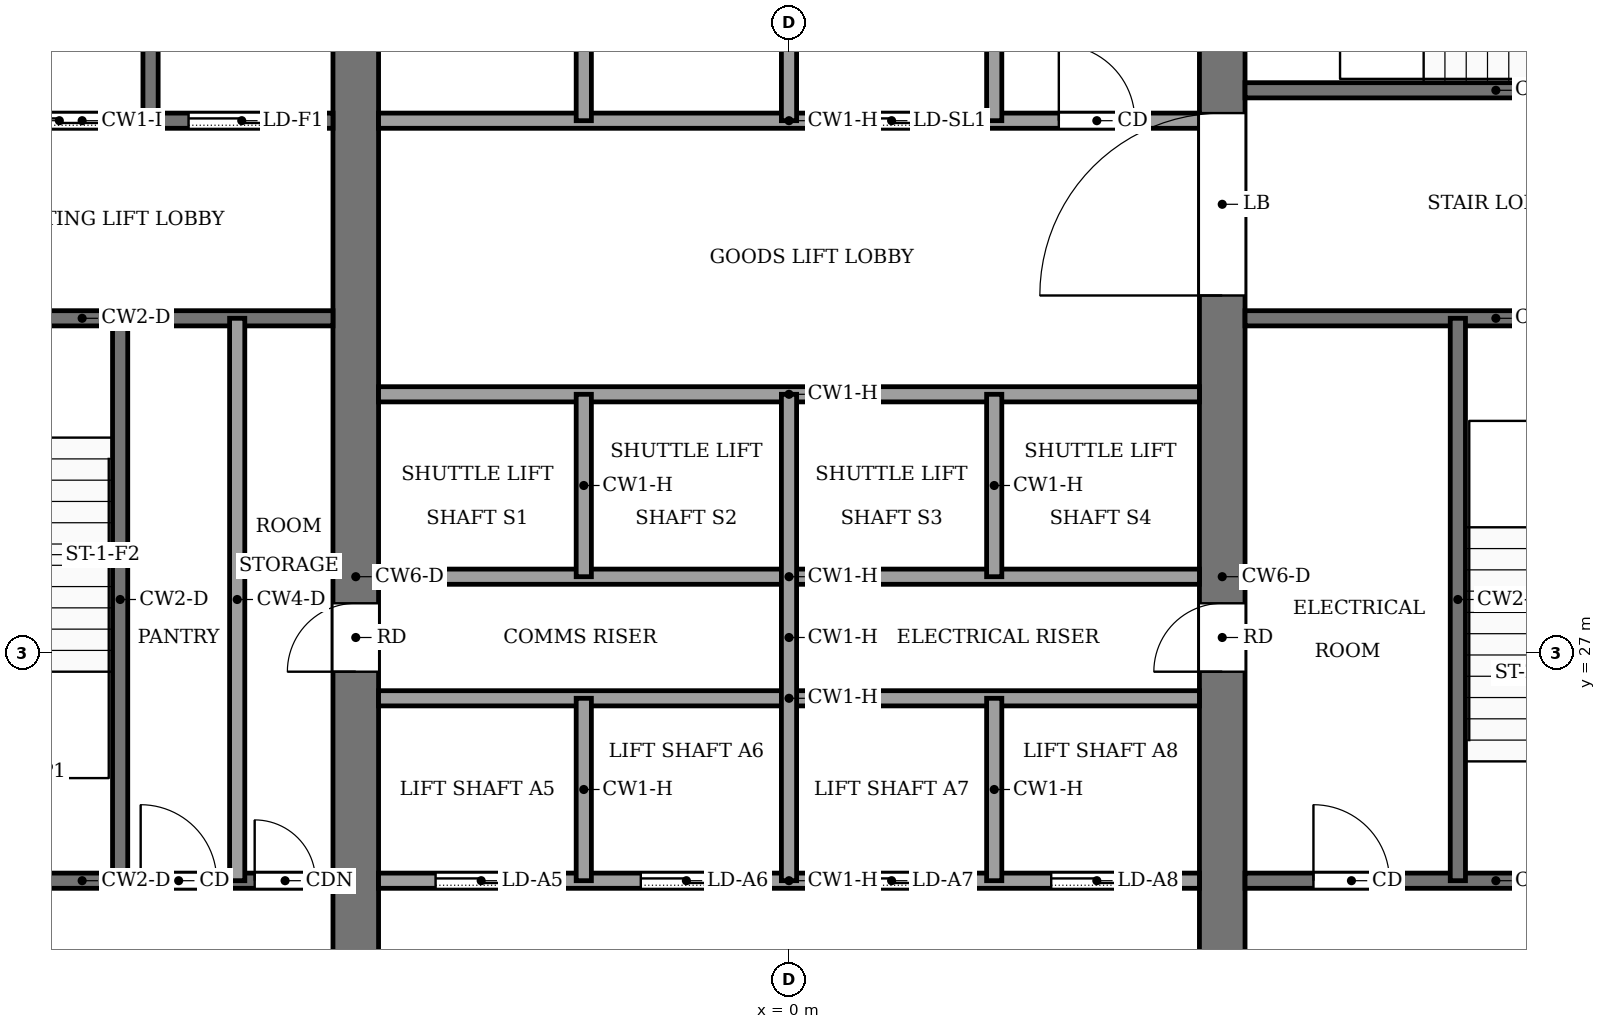
"""IFC4 building model, lengths in metres.
Left out: names, types, materials, properties, quantities, classifications, styles, units other than length and angle.
Written with IfcOpenShell. Run it as: python <this file> out.ifc"""

import sys

from ifc_helpers import new_model, si_unit, direction, frame, frame_2d, origin, place, context, subcontext, project, spatial, rectangle, extrude, element, fill, save


model = new_model("IFC4")
c1 = context("Model", 3, precision=1e-05, world=origin(), true_north=direction((0.0, 1.0)))
c2 = subcontext(c1, "Body", "Model", "MODEL_VIEW")
j1 = project(units=[si_unit("LENGTHUNIT", "METRE"), si_unit("PLANEANGLEUNIT", "RADIAN")], contexts=[c1])
p1 = place(None, origin())
s1 = spatial("IfcSite", under=j1, at=p1, CompositionType="ELEMENT")
p2 = place(p1, origin())
s2 = spatial("IfcBuilding", under=s1, at=p2, CompositionType="ELEMENT")
p3 = place(p2, frame((0.0, 0.0, 110.0)))
s3 = spatial("IfcBuildingStorey", under=s2, at=p3, CompositionType="ELEMENT", Elevation=110.0)
p4 = place(p3, frame((-5.7, 18.4, -0.13), z_axis=(0.0, 0.0, 1.0), x_axis=(0.0, 1.0, 0.0)))
e1 = element("IfcWall", 1, at=p4, inside=s3, PredefinedType="SHEAR", context=c2, shape_type="SweptSolid", body=[
    extrude(rectangle(XDim=19.2, YDim=0.6, at=frame_2d((9.6, 0.0))), origin(), (0.0, 0.0, 1.0), 3.88),
])
p5 = place(p4, frame((8.35, 0.0, 0.13)))
e2 = element("IfcOpeningElement", 2, at=p5, cuts=e1, PredefinedType="OPENING", context=c2, shape_type="SweptSolid", body=[
    extrude(rectangle(XDim=0.9, YDim=2.1, at=frame_2d((0.45, 1.05))), frame((0.0, 0.31, 0.0), z_axis=(0.0, -1.0, 0.0), x_axis=(1.0, 0.0, 0.0)), (0.0, 0.0, 1.0), 0.62),
])
p6 = place(p3, frame((5.7, 18.4, -0.13), z_axis=(0.0, 0.0, 1.0), x_axis=(0.0, 1.0, 0.0)))
e3 = element("IfcWall", 3, at=p6, inside=s3, PredefinedType="SHEAR", context=c2, shape_type="SweptSolid", body=[
    extrude(rectangle(XDim=19.2, YDim=0.6, at=frame_2d((9.6, 0.0))), origin(), (0.0, 0.0, 1.0), 3.88),
])
p7 = place(p6, frame((8.35, 0.0, 0.13)))
e4 = element("IfcOpeningElement", 4, at=p7, cuts=e3, PredefinedType="OPENING", context=c2, shape_type="SweptSolid", body=[
    extrude(rectangle(XDim=0.9, YDim=2.1, at=frame_2d((0.45, 1.05))), frame((0.0, 0.31, 0.0), z_axis=(0.0, -1.0, 0.0), x_axis=(1.0, 0.0, 0.0)), (0.0, 0.0, 1.0), 0.62),
])
p8 = place(p6, frame((13.3, 0.0, 0.13)))
e5 = element("IfcOpeningElement", 5, at=p8, cuts=e3, PredefinedType="OPENING", context=c2, shape_type="SweptSolid", body=[
    extrude(rectangle(XDim=2.4, YDim=2.4, at=frame_2d((1.2, 1.2))), frame((0.0, 0.31, 0.0), z_axis=(0.0, -1.0, 0.0), x_axis=(1.0, 0.0, 0.0)), (0.0, 0.0, 1.0), 0.62),
])
p9 = place(p3, frame((-12.6, 24.0, 0.0), z_axis=(0.0, 0.0, 1.0), x_axis=(1.0, 0.0, 0.0)))
e6 = element("IfcWall", 6, at=p9, inside=s3, PredefinedType="PARTITIONING", context=c2, shape_type="SweptSolid", body=[
    extrude(rectangle(XDim=6.6, YDim=0.2, at=frame_2d((3.3, 0.0))), origin(), (0.0, 0.0, 1.0), 3.75),
])
p10 = place(p9, frame((4.07, 0.0, 0.0)))
e7 = element("IfcOpeningElement", 7, at=p10, cuts=e6, PredefinedType="OPENING", context=c2, shape_type="SweptSolid", body=[
    extrude(rectangle(XDim=1.0, YDim=2.1, at=frame_2d((0.5, 1.05))), frame((0.0, 0.11, 0.0), z_axis=(0.0, -1.0, 0.0), x_axis=(1.0, 0.0, 0.0)), (0.0, 0.0, 1.0), 0.22),
])
p11 = place(p9, frame((5.57, 0.0, 0.0)))
e8 = element("IfcOpeningElement", 8, at=p11, cuts=e6, PredefinedType="OPENING", context=c2, shape_type="SweptSolid", body=[
    extrude(rectangle(XDim=0.8, YDim=2.1, at=frame_2d((0.4, 1.05))), frame((0.0, 0.11, 0.0), z_axis=(0.0, -1.0, 0.0), x_axis=(1.0, 0.0, 0.0)), (0.0, 0.0, 1.0), 0.22),
])
p12 = place(p3, frame((-5.4, 24.0, 0.0), z_axis=(0.0, 0.0, 1.0), x_axis=(1.0, 0.0, 0.0)))
e9 = element("IfcWall", 9, at=p12, inside=s3, PredefinedType="PARTITIONING", context=c2, shape_type="SweptSolid", body=[
    extrude(rectangle(XDim=10.8, YDim=0.2, at=frame_2d((5.4, 0.0))), origin(), (0.0, 0.0, 1.0), 3.75),
])
p13 = place(p12, frame((0.75, 0.0, 0.0)))
e10 = element("IfcOpeningElement", 10, at=p13, cuts=e9, PredefinedType="OPENING", context=c2, shape_type="SweptSolid", body=[
    extrude(rectangle(XDim=1.2, YDim=2.2, at=frame_2d((0.6, 1.1))), frame((0.0, 0.11, 0.0), z_axis=(0.0, -1.0, 0.0), x_axis=(1.0, 0.0, 0.0)), (0.0, 0.0, 1.0), 0.22),
])
p14 = place(p12, frame((3.45, 0.0, 0.0)))
e11 = element("IfcOpeningElement", 11, at=p14, cuts=e9, PredefinedType="OPENING", context=c2, shape_type="SweptSolid", body=[
    extrude(rectangle(XDim=1.2, YDim=2.2, at=frame_2d((0.6, 1.1))), frame((0.0, 0.11, 0.0), z_axis=(0.0, -1.0, 0.0), x_axis=(1.0, 0.0, 0.0)), (0.0, 0.0, 1.0), 0.22),
])
p15 = place(p12, frame((6.15, 0.0, 0.0)))
e12 = element("IfcOpeningElement", 12, at=p15, cuts=e9, PredefinedType="OPENING", context=c2, shape_type="SweptSolid", body=[
    extrude(rectangle(XDim=1.2, YDim=2.2, at=frame_2d((0.6, 1.1))), frame((0.0, 0.11, 0.0), z_axis=(0.0, -1.0, 0.0), x_axis=(1.0, 0.0, 0.0)), (0.0, 0.0, 1.0), 0.22),
])
p16 = place(p12, frame((8.85, 0.0, 0.0)))
e13 = element("IfcOpeningElement", 13, at=p16, cuts=e9, PredefinedType="OPENING", context=c2, shape_type="SweptSolid", body=[
    extrude(rectangle(XDim=1.2, YDim=2.2, at=frame_2d((0.6, 1.1))), frame((0.0, 0.11, 0.0), z_axis=(0.0, -1.0, 0.0), x_axis=(1.0, 0.0, 0.0)), (0.0, 0.0, 1.0), 0.22),
])
p17 = place(p3, frame((6.0, 24.0, 0.0), z_axis=(0.0, 0.0, 1.0), x_axis=(1.0, 0.0, 0.0)))
e14 = element("IfcWall", 14, at=p17, inside=s3, PredefinedType="PARTITIONING", context=c2, shape_type="SweptSolid", body=[
    extrude(rectangle(XDim=6.6, YDim=0.2, at=frame_2d((3.3, 0.0))), origin(), (0.0, 0.0, 1.0), 3.75),
])
p18 = place(p17, frame((0.9, 0.0, 0.0)))
e15 = element("IfcOpeningElement", 15, at=p18, cuts=e14, PredefinedType="OPENING", context=c2, shape_type="SweptSolid", body=[
    extrude(rectangle(XDim=1.0, YDim=2.1, at=frame_2d((0.5, 1.05))), frame((0.0, 0.11, 0.0), z_axis=(0.0, -1.0, 0.0), x_axis=(1.0, 0.0, 0.0)), (0.0, 0.0, 1.0), 0.22),
])
p19 = place(p17, frame((4.4, 0.0, 0.0)))
e16 = element("IfcOpeningElement", 16, at=p19, cuts=e14, PredefinedType="OPENING", context=c2, shape_type="SweptSolid", body=[
    extrude(rectangle(XDim=1.2, YDim=2.2, at=frame_2d((0.6, 1.1))), frame((0.0, 0.11, 0.0), z_axis=(0.0, -1.0, 0.0), x_axis=(1.0, 0.0, 0.0)), (0.0, 0.0, 1.0), 0.22),
])
for number, where, z_axis, x_axis in (
    (17, (-5.4, 26.4, 0.0), (0.0, 0.0, 1.0), (1.0, 0.0, 0.0)),
    (18, (-5.4, 28.0, 0.0), (0.0, 0.0, 1.0), (1.0, 0.0, 0.0)),
    (19, (-5.4, 30.4, 0.0), (0.0, 0.0, 1.0), (1.0, 0.0, 0.0)),
):
    element("IfcWall", number, at=place(p3, frame(where, z_axis=z_axis, x_axis=x_axis)), inside=s3, PredefinedType="PARTITIONING", context=c2, shape_type="SweptSolid", body=[
        extrude(rectangle(XDim=10.8, YDim=0.2, at=frame_2d((5.4, 0.0))), origin(), (0.0, 0.0, 1.0), 3.75),
    ])
p20 = place(p3, frame((-12.6, 31.4, 0.0), z_axis=(0.0, 0.0, 1.0), x_axis=(1.0, 0.0, 0.0)))
e20 = element("IfcWall", 20, at=p20, inside=s3, PredefinedType="PARTITIONING", context=c2, shape_type="SweptSolid", body=[
    extrude(rectangle(XDim=6.6, YDim=0.2, at=frame_2d((3.3, 0.0))), origin(), (0.0, 0.0, 1.0), 3.75),
])
p21 = place(p20, frame((1.0, 0.0, 0.0)))
e21 = element("IfcOpeningElement", 21, at=p21, cuts=e20, PredefinedType="OPENING", context=c2, shape_type="SweptSolid", body=[
    extrude(rectangle(XDim=1.2, YDim=2.2, at=frame_2d((0.6, 1.1))), frame((0.0, 0.11, 0.0), z_axis=(0.0, -1.0, 0.0), x_axis=(1.0, 0.0, 0.0)), (0.0, 0.0, 1.0), 0.22),
])
p22 = place(p3, frame((6.0, 31.4, 0.0), z_axis=(0.0, 0.0, 1.0), x_axis=(1.0, 0.0, 0.0)))
e22 = element("IfcWall", 22, at=p22, inside=s3, PredefinedType="PARTITIONING", context=c2, shape_type="SweptSolid", body=[
    extrude(rectangle(XDim=6.6, YDim=0.2, at=frame_2d((3.3, 0.0))), origin(), (0.0, 0.0, 1.0), 3.75),
])
p23 = place(p3, frame((-12.6, 34.0, 0.0), z_axis=(0.0, 0.0, 1.0), x_axis=(1.0, 0.0, 0.0)))
e23 = element("IfcWall", 23, at=p23, inside=s3, PredefinedType="PARTITIONING", context=c2, shape_type="SweptSolid", body=[
    extrude(rectangle(XDim=6.6, YDim=0.2, at=frame_2d((3.3, 0.0))), origin(), (0.0, 0.0, 1.0), 3.75),
])
p24 = place(p23, frame((4.7, 0.0, 0.0)))
e24 = element("IfcOpeningElement", 24, at=p24, cuts=e23, PredefinedType="OPENING", context=c2, shape_type="SweptSolid", body=[
    extrude(rectangle(XDim=1.4, YDim=2.2, at=frame_2d((0.7, 1.1))), frame((0.0, 0.11, 0.0), z_axis=(0.0, -1.0, 0.0), x_axis=(1.0, 0.0, 0.0)), (0.0, 0.0, 1.0), 0.22),
])
p25 = place(p23, frame((2.3, 0.0, 0.0)))
e25 = element("IfcOpeningElement", 25, at=p25, cuts=e23, PredefinedType="OPENING", context=c2, shape_type="SweptSolid", body=[
    extrude(rectangle(XDim=1.4, YDim=2.2, at=frame_2d((0.7, 1.1))), frame((0.0, 0.11, 0.0), z_axis=(0.0, -1.0, 0.0), x_axis=(1.0, 0.0, 0.0)), (0.0, 0.0, 1.0), 0.22),
])
p26 = place(p23, frame((0.45, 0.0, 0.0)))
e26 = element("IfcOpeningElement", 26, at=p26, cuts=e23, PredefinedType="OPENING", context=c2, shape_type="SweptSolid", body=[
    extrude(rectangle(XDim=0.9, YDim=2.1, at=frame_2d((0.45, 1.05))), frame((0.0, 0.11, 0.0), z_axis=(0.0, -1.0, 0.0), x_axis=(1.0, 0.0, 0.0)), (0.0, 0.0, 1.0), 0.22),
])
p27 = place(p3, frame((-5.4, 34.0, 0.0), z_axis=(0.0, 0.0, 1.0), x_axis=(1.0, 0.0, 0.0)))
e27 = element("IfcWall", 27, at=p27, inside=s3, PredefinedType="PARTITIONING", context=c2, shape_type="SweptSolid", body=[
    extrude(rectangle(XDim=10.8, YDim=0.2, at=frame_2d((5.4, 0.0))), origin(), (0.0, 0.0, 1.0), 3.75),
])
p28 = place(p27, frame((6.15, 0.0, 0.0)))
e28 = element("IfcOpeningElement", 28, at=p28, cuts=e27, PredefinedType="OPENING", context=c2, shape_type="SweptSolid", body=[
    extrude(rectangle(XDim=1.2, YDim=2.2, at=frame_2d((0.6, 1.1))), frame((0.0, 0.11, 0.0), z_axis=(0.0, -1.0, 0.0), x_axis=(1.0, 0.0, 0.0)), (0.0, 0.0, 1.0), 0.22),
])
p29 = place(p27, frame((8.95, 0.0, 0.0)))
e29 = element("IfcOpeningElement", 29, at=p29, cuts=e27, PredefinedType="OPENING", context=c2, shape_type="SweptSolid", body=[
    extrude(rectangle(XDim=1.0, YDim=2.1, at=frame_2d((0.5, 1.05))), frame((0.0, 0.11, 0.0), z_axis=(0.0, -1.0, 0.0), x_axis=(1.0, 0.0, 0.0)), (0.0, 0.0, 1.0), 0.22),
])
p30 = place(p3, frame((6.0, 34.4, 0.0), z_axis=(0.0, 0.0, 1.0), x_axis=(1.0, 0.0, 0.0)))
e30 = element("IfcWall", 30, at=p30, inside=s3, PredefinedType="PARTITIONING", context=c2, shape_type="SweptSolid", body=[
    extrude(rectangle(XDim=6.6, YDim=0.2, at=frame_2d((3.3, 0.0))), origin(), (0.0, 0.0, 1.0), 3.75),
])
p31 = place(p30, frame((4.8, 0.0, 0.0)))
e31 = element("IfcOpeningElement", 31, at=p31, cuts=e30, PredefinedType="OPENING", context=c2, shape_type="SweptSolid", body=[
    extrude(rectangle(XDim=1.2, YDim=2.2, at=frame_2d((0.6, 1.1))), frame((0.0, 0.11, 0.0), z_axis=(0.0, -1.0, 0.0), x_axis=(1.0, 0.0, 0.0)), (0.0, 0.0, 1.0), 0.22),
])
p32 = place(p3, frame((-8.8, 24.0, 0.0), z_axis=(0.0, 0.0, 1.0), x_axis=(0.0, 1.0, 0.0)))
e32 = element("IfcWall", 32, at=p32, inside=s3, PredefinedType="PARTITIONING", context=c2, shape_type="SweptSolid", body=[
    extrude(rectangle(XDim=7.4, YDim=0.2, at=frame_2d((3.7, 0.0))), origin(), (0.0, 0.0, 1.0), 3.75),
])
p33 = place(p3, frame((-8.4, 34.0, 0.0), z_axis=(0.0, 0.0, 1.0), x_axis=(0.0, 1.0, 0.0)))
e33 = element("IfcWall", 33, at=p33, inside=s3, PredefinedType="PARTITIONING", context=c2, shape_type="SweptSolid", body=[
    extrude(rectangle(XDim=3.6, YDim=0.2, at=frame_2d((1.8, 0.0))), origin(), (0.0, 0.0, 1.0), 3.75),
])
p34 = place(p3, frame((-7.26, 24.0, 0.0), z_axis=(0.0, 0.0, 1.0), x_axis=(0.0, 1.0, 0.0)))
e34 = element("IfcWall", 34, at=p34, inside=s3, PredefinedType="PARTITIONING", context=c2, shape_type="SweptSolid", body=[
    extrude(rectangle(XDim=7.4, YDim=0.2, at=frame_2d((3.7, 0.0))), origin(), (0.0, 0.0, 1.0), 3.75),
])
for number, where, z_axis, x_axis in (
    (35, (-2.7, 24.0, 0.0), (0.0, 0.0, 1.0), (0.0, 1.0, 0.0)),
    (36, (-2.7, 28.0, 0.0), (0.0, 0.0, 1.0), (0.0, 1.0, 0.0)),
):
    element("IfcWall", number, at=place(p3, frame(where, z_axis=z_axis, x_axis=x_axis)), inside=s3, PredefinedType="PARTITIONING", context=c2, shape_type="SweptSolid", body=[
        extrude(rectangle(XDim=2.4, YDim=0.2, at=frame_2d((1.2, 0.0))), origin(), (0.0, 0.0, 1.0), 3.75),
    ])
p35 = place(p3, frame((-2.7, 34.0, 0.0), z_axis=(0.0, 0.0, 1.0), x_axis=(0.0, 1.0, 0.0)))
e37 = element("IfcWall", 37, at=p35, inside=s3, PredefinedType="PARTITIONING", context=c2, shape_type="SweptSolid", body=[
    extrude(rectangle(XDim=3.6, YDim=0.2, at=frame_2d((1.8, 0.0))), origin(), (0.0, 0.0, 1.0), 3.75),
])
p36 = place(p3, frame((0.0, 24.0, 0.0), z_axis=(0.0, 0.0, 1.0), x_axis=(0.0, 1.0, 0.0)))
e38 = element("IfcWall", 38, at=p36, inside=s3, PredefinedType="PARTITIONING", context=c2, shape_type="SweptSolid", body=[
    extrude(rectangle(XDim=6.4, YDim=0.2, at=frame_2d((3.2, 0.0))), origin(), (0.0, 0.0, 1.0), 3.75),
])
p37 = place(p3, frame((0.0, 34.0, 0.0), z_axis=(0.0, 0.0, 1.0), x_axis=(0.0, 1.0, 0.0)))
e39 = element("IfcWall", 39, at=p37, inside=s3, PredefinedType="PARTITIONING", context=c2, shape_type="SweptSolid", body=[
    extrude(rectangle(XDim=3.6, YDim=0.2, at=frame_2d((1.8, 0.0))), origin(), (0.0, 0.0, 1.0), 3.75),
])
for number, where, z_axis, x_axis in (
    (40, (2.7, 24.0, 0.0), (0.0, 0.0, 1.0), (0.0, 1.0, 0.0)),
    (41, (2.7, 28.0, 0.0), (0.0, 0.0, 1.0), (0.0, 1.0, 0.0)),
):
    element("IfcWall", number, at=place(p3, frame(where, z_axis=z_axis, x_axis=x_axis)), inside=s3, PredefinedType="PARTITIONING", context=c2, shape_type="SweptSolid", body=[
        extrude(rectangle(XDim=2.4, YDim=0.2, at=frame_2d((1.2, 0.0))), origin(), (0.0, 0.0, 1.0), 3.75),
    ])
p38 = place(p3, frame((2.7, 34.0, 0.0), z_axis=(0.0, 0.0, 1.0), x_axis=(0.0, 1.0, 0.0)))
e42 = element("IfcWall", 42, at=p38, inside=s3, PredefinedType="PARTITIONING", context=c2, shape_type="SweptSolid", body=[
    extrude(rectangle(XDim=3.6, YDim=0.2, at=frame_2d((1.8, 0.0))), origin(), (0.0, 0.0, 1.0), 3.75),
])
p39 = place(p3, frame((8.8, 24.0, 0.0), z_axis=(0.0, 0.0, 1.0), x_axis=(0.0, 1.0, 0.0)))
e43 = element("IfcWall", 43, at=p39, inside=s3, PredefinedType="PARTITIONING", context=c2, shape_type="SweptSolid", body=[
    extrude(rectangle(XDim=7.4, YDim=0.2, at=frame_2d((3.7, 0.0))), origin(), (0.0, 0.0, 1.0), 3.75),
])
p40 = place(p13, origin())
e44 = element("IfcDoor", 44, at=p40, inside=s3, OperationType="SLIDING_TO_LEFT", PredefinedType="DOOR", context=c2, shape_type="SweptSolid", body=[
    extrude(rectangle(XDim=1.2, YDim=2.2, at=frame_2d((0.6, 1.1))), frame((0.0, 0.025, 0.0), z_axis=(0.0, -1.0, 0.0), x_axis=(1.0, 0.0, 0.0)), (0.0, 0.0, 1.0), 0.05),
])
fill(e10, e44)
p41 = place(p14, origin())
e45 = element("IfcDoor", 45, at=p41, inside=s3, OperationType="SLIDING_TO_LEFT", PredefinedType="DOOR", context=c2, shape_type="SweptSolid", body=[
    extrude(rectangle(XDim=1.2, YDim=2.2, at=frame_2d((0.6, 1.1))), frame((0.0, 0.025, 0.0), z_axis=(0.0, -1.0, 0.0), x_axis=(1.0, 0.0, 0.0)), (0.0, 0.0, 1.0), 0.05),
])
fill(e11, e45)
p42 = place(p15, origin())
e46 = element("IfcDoor", 46, at=p42, inside=s3, OperationType="SLIDING_TO_LEFT", PredefinedType="DOOR", context=c2, shape_type="SweptSolid", body=[
    extrude(rectangle(XDim=1.2, YDim=2.2, at=frame_2d((0.6, 1.1))), frame((0.0, 0.025, 0.0), z_axis=(0.0, -1.0, 0.0), x_axis=(1.0, 0.0, 0.0)), (0.0, 0.0, 1.0), 0.05),
])
fill(e12, e46)
p43 = place(p16, origin())
e47 = element("IfcDoor", 47, at=p43, inside=s3, OperationType="SLIDING_TO_LEFT", PredefinedType="DOOR", context=c2, shape_type="SweptSolid", body=[
    extrude(rectangle(XDim=1.2, YDim=2.2, at=frame_2d((0.6, 1.1))), frame((0.0, 0.025, 0.0), z_axis=(0.0, -1.0, 0.0), x_axis=(1.0, 0.0, 0.0)), (0.0, 0.0, 1.0), 0.05),
])
fill(e13, e47)
p44 = place(p28, origin())
e48 = element("IfcDoor", 48, at=p44, inside=s3, OperationType="SLIDING_TO_LEFT", PredefinedType="DOOR", context=c2, shape_type="SweptSolid", body=[
    extrude(rectangle(XDim=1.2, YDim=2.2, at=frame_2d((0.6, 1.1))), frame((0.0, 0.025, 0.0), z_axis=(0.0, -1.0, 0.0), x_axis=(1.0, 0.0, 0.0)), (0.0, 0.0, 1.0), 0.05),
])
fill(e28, e48)
p45 = place(p24, origin())
e49 = element("IfcDoor", 49, at=p45, inside=s3, OperationType="SLIDING_TO_LEFT", PredefinedType="DOOR", context=c2, shape_type="SweptSolid", body=[
    extrude(rectangle(XDim=1.4, YDim=2.2, at=frame_2d((0.7, 1.1))), frame((0.0, 0.025, 0.0), z_axis=(0.0, -1.0, 0.0), x_axis=(1.0, 0.0, 0.0)), (0.0, 0.0, 1.0), 0.05),
])
fill(e24, e49)
p46 = place(p25, origin())
e50 = element("IfcDoor", 50, at=p46, inside=s3, OperationType="SLIDING_TO_LEFT", PredefinedType="DOOR", context=c2, shape_type="SweptSolid", body=[
    extrude(rectangle(XDim=1.4, YDim=2.2, at=frame_2d((0.7, 1.1))), frame((0.0, 0.025, 0.0), z_axis=(0.0, -1.0, 0.0), x_axis=(1.0, 0.0, 0.0)), (0.0, 0.0, 1.0), 0.05),
])
fill(e25, e50)
p47 = place(p10, origin())
e51 = element("IfcDoor", 51, at=p47, inside=s3, OperationType="SINGLE_SWING_RIGHT", PredefinedType="DOOR", context=c2, shape_type="SweptSolid", body=[
    extrude(rectangle(XDim=1.0, YDim=2.1, at=frame_2d((0.5, 1.05))), frame((0.0, 0.025, 0.0), z_axis=(0.0, -1.0, 0.0), x_axis=(1.0, 0.0, 0.0)), (0.0, 0.0, 1.0), 0.05),
])
fill(e7, e51)
p48 = place(p11, origin())
e52 = element("IfcDoor", 52, at=p48, inside=s3, OperationType="SINGLE_SWING_LEFT", PredefinedType="DOOR", context=c2, shape_type="SweptSolid", body=[
    extrude(rectangle(XDim=0.8, YDim=2.1, at=frame_2d((0.4, 1.05))), frame((0.0, 0.025, 0.0), z_axis=(0.0, -1.0, 0.0), x_axis=(1.0, 0.0, 0.0)), (0.0, 0.0, 1.0), 0.05),
])
fill(e8, e52)
p49 = place(p18, origin())
e53 = element("IfcDoor", 53, at=p49, inside=s3, OperationType="SINGLE_SWING_RIGHT", PredefinedType="DOOR", context=c2, shape_type="SweptSolid", body=[
    extrude(rectangle(XDim=1.0, YDim=2.1, at=frame_2d((0.5, 1.05))), frame((0.0, 0.025, 0.0), z_axis=(0.0, -1.0, 0.0), x_axis=(1.0, 0.0, 0.0)), (0.0, 0.0, 1.0), 0.05),
])
fill(e15, e53)
p50 = place(p29, origin())
e54 = element("IfcDoor", 54, at=p50, inside=s3, OperationType="SINGLE_SWING_LEFT", PredefinedType="DOOR", context=c2, shape_type="SweptSolid", body=[
    extrude(rectangle(XDim=1.0, YDim=2.1, at=frame_2d((0.5, 1.05))), frame((0.0, 0.025, 0.0), z_axis=(0.0, -1.0, 0.0), x_axis=(1.0, 0.0, 0.0)), (0.0, 0.0, 1.0), 0.05),
])
fill(e29, e54)
p51 = place(p5, origin())
e55 = element("IfcDoor", 55, at=p51, inside=s3, OperationType="SINGLE_SWING_LEFT", PredefinedType="DOOR", context=c2, shape_type="SweptSolid", body=[
    extrude(rectangle(XDim=0.9, YDim=2.1, at=frame_2d((0.45, 1.05))), frame((0.0, 0.025, 0.0), z_axis=(0.0, -1.0, 0.0), x_axis=(1.0, 0.0, 0.0)), (0.0, 0.0, 1.0), 0.05),
])
fill(e2, e55)
p52 = place(p7, origin())
e56 = element("IfcDoor", 56, at=p52, inside=s3, OperationType="SINGLE_SWING_RIGHT", PredefinedType="DOOR", context=c2, shape_type="SweptSolid", body=[
    extrude(rectangle(XDim=0.9, YDim=2.1, at=frame_2d((0.45, 1.05))), frame((0.0, 0.025, 0.0), z_axis=(0.0, -1.0, 0.0), x_axis=(1.0, 0.0, 0.0)), (0.0, 0.0, 1.0), 0.05),
])
fill(e4, e56)
p53 = place(p8, origin())
e57 = element("IfcDoor", 57, at=p53, inside=s3, OperationType="DOUBLE_DOOR_SINGLE_SWING", PredefinedType="DOOR", context=c2, shape_type="SweptSolid", body=[
    extrude(rectangle(XDim=2.4, YDim=2.4, at=frame_2d((1.2, 1.2))), frame((0.0, 0.025, 0.0), z_axis=(0.0, -1.0, 0.0), x_axis=(1.0, 0.0, 0.0)), (0.0, 0.0, 1.0), 0.05),
])
fill(e5, e57)
save(model, sys.argv[1])
